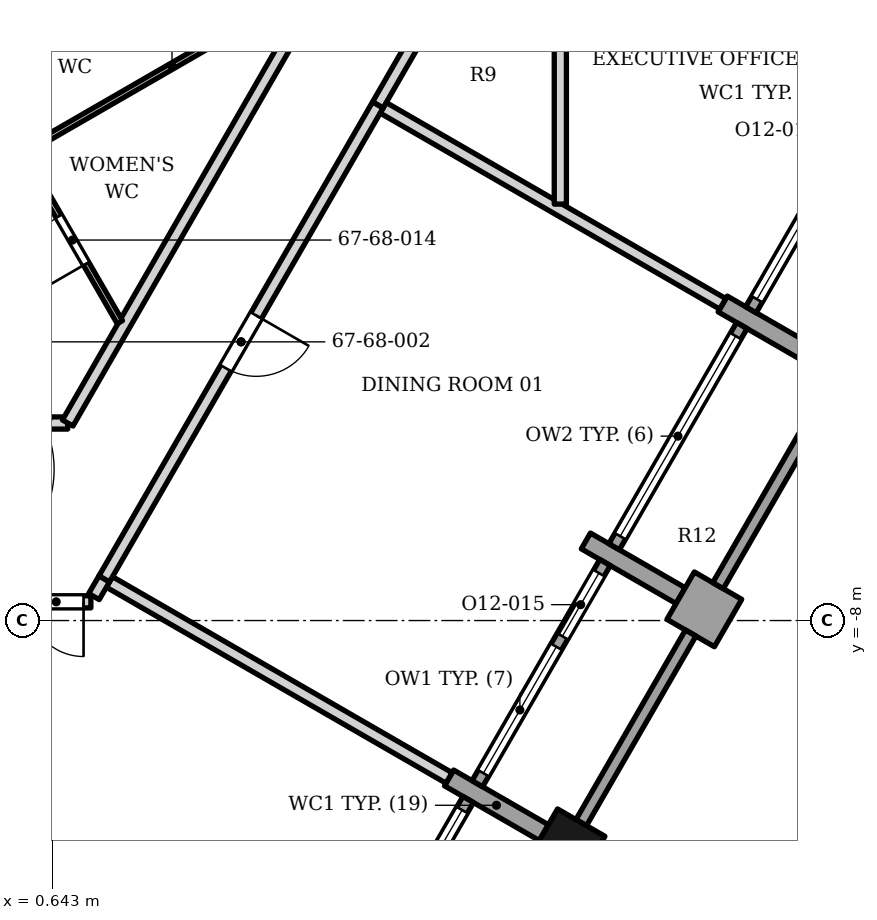
"""IFC4 building model, lengths in metres.
Left out: names, types, materials, properties, quantities, classifications, styles, units other than length and angle.
Written with IfcOpenShell. Run it as: python <this file> out.ifc"""

import sys

from ifc_helpers import new_model, si_unit, direction, frame, frame_2d, origin, origin_2d, place, context, subcontext, project, spatial, rectangle, extrude, element, fill, save


model = new_model("IFC4")
c1 = context("Model", 3, precision=1e-05, world=origin(), true_north=direction((0.0, 1.0)))
c2 = subcontext(c1, "Body", "Model", "MODEL_VIEW")
j1 = project(units=[si_unit("LENGTHUNIT", "METRE"), si_unit("PLANEANGLEUNIT", "RADIAN")], contexts=[c1])
p1 = place(None, origin())
s1 = spatial("IfcSite", under=j1, at=p1, CompositionType="ELEMENT")
p2 = place(p1, origin())
s2 = spatial("IfcBuilding", under=s1, at=p2, CompositionType="ELEMENT")
p3 = place(p2, frame((0.0, 0.0, 279.4)))
s3 = spatial("IfcBuildingStorey", under=s2, at=p3, CompositionType="ELEMENT", Elevation=279.4)
p4 = place(p3, frame((9.119, -11.713, 0.0), z_axis=(0.0, 0.0, 1.0), x_axis=(0.5, 0.866025403784, 0.0)))
e1 = element("IfcColumn", 1, at=p4, inside=s3, PredefinedType="COLUMN", context=c2, shape_type="SweptSolid", body=[
    extrude(rectangle(XDim=0.9, YDim=0.9, at=origin_2d()), origin(), (0.0, 0.0, 1.0), 3.9),
])
p5 = place(p3, frame((8.729, -11.488, 0.0), z_axis=(0.0, 0.0, 1.0), x_axis=(-0.866047807691, 0.499961193289, 0.0)))
e2 = element("IfcWall", 2, at=p5, inside=s3, PredefinedType="SOLIDWALL", context=c2, shape_type="SweptSolid", body=[
    extrude(rectangle(XDim=1.8, YDim=0.3, at=frame_2d((0.9, 0.0))), origin(), (0.0, 0.0, 1.0), 3.0),
])
p6 = place(p3, frame((11.759, -8.041, 0.0), z_axis=(0.0, 0.0, 1.0), x_axis=(-0.866013897511, 0.50001992892, 0.0)))
e3 = element("IfcWall", 3, at=p6, inside=s3, PredefinedType="SOLIDWALL", context=c2, shape_type="SweptSolid", body=[
    extrude(rectangle(XDim=0.9, YDim=0.9, at=frame_2d((0.45, 0.0))), origin(), (0.0, 0.0, 1.0), 3.0),
])
for number, where, z_axis, x_axis in (
    (4, (9.42, -6.691, 0.0), (0.0, 0.0, 1.0), (0.866, -0.5, 0.0)),
    (5, (13.229, -3.694, 0.0), (0.0, 0.0, 1.0), (-0.866, 0.5, 0.0)),
):
    element("IfcWall", number, at=place(p3, frame(where, z_axis=z_axis, x_axis=x_axis)), inside=s3, PredefinedType="SOLIDWALL", context=c2, shape_type="SweptSolid", body=[
        extrude(rectangle(XDim=1.8, YDim=0.3, at=frame_2d((0.9, 0.0))), origin(), (0.0, 0.0, 1.0), 3.0),
    ])
p7 = place(p3, frame((5.385, -14.58, 0.0), z_axis=(0.0, 0.0, 1.0), x_axis=(0.500002543286, 0.866023935413, 0.0)))
e6 = element("IfcWall", 6, at=p7, inside=s3, PredefinedType="ELEMENTEDWALL", context=c2, shape_type="SweptSolid", body=[
    extrude(rectangle(XDim=4.2, YDim=0.2, at=frame_2d((2.1, 0.0))), origin(), (0.0, 0.0, 1.0), 2.95),
])
p8 = place(p7, frame((0.2, 0.0, 0.45)))
e7 = element("IfcOpeningElement", 7, at=p8, cuts=e6, PredefinedType="OPENING", context=c2, shape_type="SweptSolid", body=[
    extrude(rectangle(XDim=3.8, YDim=2.25, at=frame_2d((1.9, 1.125))), frame((0.0, 0.11, 0.0), z_axis=(0.0, -1.0, 0.0), x_axis=(1.0, 0.0, 0.0)), (0.0, 0.0, 1.0), 0.22),
])
p9 = place(p3, frame((9.344, -11.323, 0.0), z_axis=(0.0, 0.0, 1.0), x_axis=(0.500012057535, 0.866018442252, 0.0)))
e8 = element("IfcWall", 8, at=p9, inside=s3, PredefinedType="SOLIDWALL", context=c2, shape_type="SweptSolid", body=[
    extrude(rectangle(XDim=3.6, YDim=0.2, at=frame_2d((1.8, 0.0))), origin(), (0.0, 0.0, 1.0), 3.0),
])
p10 = place(p3, frame((7.635, -10.683, 0.0), z_axis=(0.0, 0.0, 1.0), x_axis=(0.500027713859, 0.866009402589, 0.0)))
e9 = element("IfcWall", 9, at=p10, inside=s3, PredefinedType="ELEMENTEDWALL", context=c2, shape_type="SweptSolid", body=[
    extrude(rectangle(XDim=4.2, YDim=0.2, at=frame_2d((2.1, 0.0))), origin(), (0.0, 0.0, 1.0), 3.0),
])
p11 = place(p10, frame((0.2, 0.0, 0.45)))
e10 = element("IfcOpeningElement", 10, at=p11, cuts=e9, PredefinedType="OPENING", context=c2, shape_type="SweptSolid", body=[
    extrude(rectangle(XDim=2.4, YDim=2.25, at=frame_2d((1.2, 1.125))), frame((0.0, 0.11, 0.0), z_axis=(0.0, -1.0, 0.0), x_axis=(1.0, 0.0, 0.0)), (0.0, 0.0, 1.0), 0.22),
])
p12 = place(p10, frame((2.8, 0.0, 0.0)))
e11 = element("IfcOpeningElement", 11, at=p12, cuts=e9, PredefinedType="OPENING", context=c2, shape_type="SweptSolid", body=[
    extrude(rectangle(XDim=1.2, YDim=2.7, at=frame_2d((0.6, 1.35))), frame((0.0, 0.11, 0.0), z_axis=(0.0, -1.0, 0.0), x_axis=(1.0, 0.0, 0.0)), (0.0, 0.0, 1.0), 0.22),
])
p13 = place(p3, frame((11.594, -7.426, 0.0), z_axis=(0.0, 0.0, 1.0), x_axis=(0.500012057535, 0.866018442252, 0.0)))
e12 = element("IfcWall", 12, at=p13, inside=s3, PredefinedType="SOLIDWALL", context=c2, shape_type="SweptSolid", body=[
    extrude(rectangle(XDim=3.6, YDim=0.2, at=frame_2d((1.8, 0.0))), origin(), (0.0, 0.0, 1.0), 3.0),
])
p14 = place(p3, frame((9.885, -6.786, 0.0), z_axis=(0.0, 0.0, 1.0), x_axis=(0.500002543286, 0.866023935413, 0.0)))
e13 = element("IfcWall", 13, at=p14, inside=s3, PredefinedType="ELEMENTEDWALL", context=c2, shape_type="SweptSolid", body=[
    extrude(rectangle(XDim=4.2, YDim=0.2, at=frame_2d((2.1, 0.0))), origin(), (0.0, 0.0, 1.0), 3.0),
])
p15 = place(p14, frame((0.2, 0.0, 0.45)))
e14 = element("IfcOpeningElement", 14, at=p15, cuts=e13, PredefinedType="OPENING", context=c2, shape_type="SweptSolid", body=[
    extrude(rectangle(XDim=3.8, YDim=2.25, at=frame_2d((1.9, 1.125))), frame((0.0, 0.11, 0.0), z_axis=(0.0, -1.0, 0.0), x_axis=(1.0, 0.0, 0.0)), (0.0, 0.0, 1.0), 0.22),
])
p16 = place(p3, frame((12.135, -2.889, 0.0), z_axis=(0.0, 0.0, 1.0), x_axis=(0.500027713859, 0.866009402589, 0.0)))
e15 = element("IfcWall", 15, at=p16, inside=s3, PredefinedType="ELEMENTEDWALL", context=c2, shape_type="SweptSolid", body=[
    extrude(rectangle(XDim=4.2, YDim=0.2, at=frame_2d((2.1, 0.0))), origin(), (0.0, 0.0, 1.0), 3.0),
])
p17 = place(p16, frame((0.2, 0.0, 0.45)))
e16 = element("IfcOpeningElement", 16, at=p17, cuts=e15, PredefinedType="OPENING", context=c2, shape_type="SweptSolid", body=[
    extrude(rectangle(XDim=2.4, YDim=2.25, at=frame_2d((1.2, 1.125))), frame((0.0, 0.11, 0.0), z_axis=(0.0, -1.0, 0.0), x_axis=(1.0, 0.0, 0.0)), (0.0, 0.0, 1.0), 0.22),
])
p18 = place(p16, frame((2.8, 0.0, 0.0)))
e17 = element("IfcOpeningElement", 17, at=p18, cuts=e15, PredefinedType="OPENING", context=c2, shape_type="SweptSolid", body=[
    extrude(rectangle(XDim=1.2, YDim=2.7, at=frame_2d((0.6, 1.35))), frame((0.0, 0.11, 0.0), z_axis=(0.0, -1.0, 0.0), x_axis=(1.0, 0.0, 0.0)), (0.0, 0.0, 1.0), 0.22),
])
p19 = place(p3, frame((1.584, -7.365, 0.0), z_axis=(0.0, 0.0, 1.0), x_axis=(0.866145880339, -0.499791270404, 0.0)))
e18 = element("IfcWall", 18, at=p19, inside=s3, PredefinedType="PARTITIONING", context=c2, shape_type="SweptSolid", body=[
    extrude(rectangle(XDim=6.449, YDim=0.2, at=frame_2d((3.225, 0.0))), origin(), (0.0, 0.0, 1.0), 2.884),
])
p20 = place(p3, frame((0.236, -7.692, 0.0), z_axis=(0.0, 0.0, 1.0), x_axis=(1.0, 0.0, 0.0)))
e19 = element("IfcWall", 19, at=p20, inside=s3, PredefinedType="PARTITIONING", context=c2, shape_type="SweptSolid", body=[
    extrude(rectangle(XDim=1.043, YDim=0.2, at=frame_2d((0.522, 0.0))), origin(), (0.0, 0.0, 1.0), 3.73),
])
p21 = place(p20, frame((0.023, 0.0, 0.0)))
e20 = element("IfcOpeningElement", 20, at=p21, cuts=e19, PredefinedType="OPENING", context=c2, shape_type="SweptSolid", body=[
    extrude(rectangle(XDim=0.9, YDim=2.1, at=frame_2d((0.45, 1.05))), frame((0.0, 0.11, 0.0), z_axis=(0.0, -1.0, 0.0), x_axis=(1.0, 0.0, 0.0)), (0.0, 0.0, 1.0), 0.22),
])
p22 = place(p3, frame((1.33, -7.606, 0.0), z_axis=(0.0, 0.0, 1.0), x_axis=(0.503375579216, 0.86406772087, 0.0)))
e21 = element("IfcWall", 21, at=p22, inside=s3, PredefinedType="PARTITIONING", context=c2, shape_type="SweptSolid", body=[
    extrude(rectangle(XDim=0.337, YDim=0.2, at=frame_2d((0.168, 0.0))), origin(), (0.0, 0.0, 1.0), 3.73),
])
p23 = place(p3, frame((0.517, -4.751, 0.0), z_axis=(0.0, 0.0, 1.0), x_axis=(1.0, 0.0, 0.0)))
e22 = element("IfcWall", 22, at=p23, inside=s3, PredefinedType="PARTITIONING", context=c2, shape_type="SweptSolid", body=[
    extrude(rectangle(XDim=0.381, YDim=0.2, at=frame_2d((0.19, 0.0))), origin(), (0.0, 0.0, 1.0), 3.73),
])
p24 = place(p3, frame((0.898, -4.751, 0.0), z_axis=(0.0, 0.0, 1.0), x_axis=(0.499141293918, 0.866520610664, 0.0)))
e23 = element("IfcWall", 23, at=p24, inside=s3, PredefinedType="PARTITIONING", context=c2, shape_type="SweptSolid", body=[
    extrude(rectangle(XDim=8.451, YDim=0.2, at=frame_2d((4.226, 0.0))), origin(), (0.0, 0.0, 1.0), 2.884),
])
p25 = place(p3, frame((6.086, 0.433, 0.0), z_axis=(0.0, 0.0, 1.0), x_axis=(0.866035557451, -0.499982412921, 0.0)))
e24 = element("IfcWall", 24, at=p25, inside=s3, PredefinedType="PARTITIONING", context=c2, shape_type="SweptSolid", body=[
    extrude(rectangle(XDim=6.449, YDim=0.2, at=frame_2d((3.225, 0.0))), origin(), (0.0, 0.0, 1.0), 3.052),
])
p26 = place(p3, frame((1.5, -7.314, 0.0), z_axis=(0.0, 0.0, 1.0), x_axis=(0.499990139034, 0.866031096941, 0.0)))
e25 = element("IfcWall", 25, at=p26, inside=s3, PredefinedType="PARTITIONING", context=c2, shape_type="SweptSolid", body=[
    extrude(rectangle(XDim=9.0, YDim=0.2, at=frame_2d((4.5, 0.0))), origin(), (0.0, 0.0, 1.0), 2.884),
])
p27 = place(p26, frame((4.0, 0.0, 0.0)))
e26 = element("IfcOpeningElement", 26, at=p27, cuts=e25, PredefinedType="OPENING", context=c2, shape_type="SweptSolid", body=[
    extrude(rectangle(XDim=1.0, YDim=2.1, at=frame_2d((0.5, 1.05))), frame((0.0, 0.11, 0.0), z_axis=(0.0, -1.0, 0.0), x_axis=(1.0, 0.0, 0.0)), (0.0, 0.0, 1.0), 0.22),
])
p28 = place(p3, frame((9.0, -1.152, 0.0), z_axis=(0.0, 0.0, 1.0), x_axis=(0.0, 1.0, 0.0)))
e27 = element("IfcWall", 27, at=p28, inside=s3, PredefinedType="PARTITIONING", context=c2, shape_type="SweptSolid", body=[
    extrude(rectangle(XDim=3.152, YDim=0.2, at=frame_2d((1.576, 0.0))), origin(), (0.0, 0.0, 1.0), 3.052),
])
p29 = place(p3, frame((-1.33, 2.252, 0.0), z_axis=(0.0, 0.0, 1.0), x_axis=(0.499984964964, -0.866034084092, 0.0)))
e28 = element("IfcWall", 28, at=p29, inside=s3, PredefinedType="PARTITIONING", context=c2, shape_type="SweptSolid", body=[
    extrude(rectangle(XDim=6.172, YDim=0.1, at=frame_2d((3.086, 0.0))), origin(), (0.0, 0.0, 1.0), 2.884),
])
p30 = place(p29, frame((1.026, 0.0, 0.0)))
e29 = element("IfcOpeningElement", 29, at=p30, cuts=e28, PredefinedType="OPENING", context=c2, shape_type="SweptSolid", body=[
    extrude(rectangle(XDim=0.9, YDim=2.1, at=frame_2d((0.45, 1.05))), frame((0.0, 0.06, 0.0), z_axis=(0.0, -1.0, 0.0), x_axis=(1.0, 0.0, 0.0)), (0.0, 0.0, 1.0), 0.12),
])
p31 = place(p29, frame((4.163, 0.0, 0.0)))
e30 = element("IfcOpeningElement", 30, at=p31, cuts=e28, PredefinedType="OPENING", context=c2, shape_type="SweptSolid", body=[
    extrude(rectangle(XDim=0.9, YDim=2.1, at=frame_2d((0.45, 1.05))), frame((0.0, 0.06, 0.0), z_axis=(0.0, -1.0, 0.0), x_axis=(1.0, 0.0, 0.0)), (0.0, 0.0, 1.0), 0.12),
])
p32 = place(p3, frame((0.19, -0.281, 0.0), z_axis=(0.0, 0.0, 1.0), x_axis=(0.866035935605, 0.499981757907, 0.0)))
e31 = element("IfcWall", 31, at=p32, inside=s3, PredefinedType="PARTITIONING", context=c2, shape_type="SweptSolid", body=[
    extrude(rectangle(XDim=5.596, YDim=0.1, at=frame_2d((2.798, 0.0))), origin(), (0.0, 0.0, 1.0), 2.884),
])
p33 = place(p3, frame((6.0, 0.481, 0.0), z_axis=(0.0, 0.0, 1.0), x_axis=(0.499648797631, 0.866228075639, 0.0)))
e32 = element("IfcWall", 32, at=p33, inside=s3, PredefinedType="PARTITIONING", context=c2, shape_type="SweptSolid", body=[
    extrude(rectangle(XDim=3.539, YDim=0.2, at=frame_2d((1.77, 0.0))), origin(), (0.0, 0.0, 1.0), 3.73),
])
p34 = place(p33, frame((1.27, 0.0, 0.0)))
e33 = element("IfcOpeningElement", 33, at=p34, cuts=e32, PredefinedType="OPENING", context=c2, shape_type="SweptSolid", body=[
    extrude(rectangle(XDim=1.0, YDim=2.4, at=frame_2d((0.5, 1.2))), frame((0.0, 0.11, 0.0), z_axis=(0.0, -1.0, 0.0), x_axis=(1.0, 0.0, 0.0)), (0.0, 0.0, 1.0), 0.22),
])
p35 = place(p8, origin())
e34 = element("IfcWindow", 34, at=p35, inside=s3, PartitioningType="SINGLE_PANEL", PredefinedType="WINDOW", context=c2, shape_type="SweptSolid", body=[
    extrude(rectangle(XDim=3.8, YDim=2.25, at=frame_2d((1.9, 1.125))), frame((0.0, 0.03, 0.0), z_axis=(0.0, -1.0, 0.0), x_axis=(1.0, 0.0, 0.0)), (0.0, 0.0, 1.0), 0.06),
])
fill(e7, e34)
p36 = place(p11, origin())
e35 = element("IfcWindow", 35, at=p36, inside=s3, PartitioningType="SINGLE_PANEL", PredefinedType="WINDOW", context=c2, shape_type="SweptSolid", body=[
    extrude(rectangle(XDim=2.4, YDim=2.25, at=frame_2d((1.2, 1.125))), frame((0.0, 0.03, 0.0), z_axis=(0.0, -1.0, 0.0), x_axis=(1.0, 0.0, 0.0)), (0.0, 0.0, 1.0), 0.06),
])
fill(e10, e35)
p37 = place(p12, origin())
e36 = element("IfcDoor", 36, at=p37, inside=s3, OperationType="SINGLE_SWING_LEFT", PredefinedType="DOOR", context=c2, shape_type="SweptSolid", body=[
    extrude(rectangle(XDim=1.2, YDim=2.7, at=frame_2d((0.6, 1.35))), frame((0.0, 0.025, 0.0), z_axis=(0.0, -1.0, 0.0), x_axis=(1.0, 0.0, 0.0)), (0.0, 0.0, 1.0), 0.05),
])
fill(e11, e36)
p38 = place(p15, origin())
e37 = element("IfcWindow", 37, at=p38, inside=s3, PartitioningType="SINGLE_PANEL", PredefinedType="WINDOW", context=c2, shape_type="SweptSolid", body=[
    extrude(rectangle(XDim=3.8, YDim=2.25, at=frame_2d((1.9, 1.125))), frame((0.0, 0.03, 0.0), z_axis=(0.0, -1.0, 0.0), x_axis=(1.0, 0.0, 0.0)), (0.0, 0.0, 1.0), 0.06),
])
fill(e14, e37)
p39 = place(p17, origin())
e38 = element("IfcWindow", 38, at=p39, inside=s3, PartitioningType="SINGLE_PANEL", PredefinedType="WINDOW", context=c2, shape_type="SweptSolid", body=[
    extrude(rectangle(XDim=2.4, YDim=2.25, at=frame_2d((1.2, 1.125))), frame((0.0, 0.03, 0.0), z_axis=(0.0, -1.0, 0.0), x_axis=(1.0, 0.0, 0.0)), (0.0, 0.0, 1.0), 0.06),
])
fill(e16, e38)
p40 = place(p27, origin())
e39 = element("IfcDoor", 39, at=p40, inside=s3, OperationType="SINGLE_SWING_RIGHT", PredefinedType="DOOR", context=c2, shape_type="SweptSolid", body=[
    extrude(rectangle(XDim=1.0, YDim=2.1, at=frame_2d((0.5, 1.05))), frame((0.0, 0.025, 0.0), z_axis=(0.0, -1.0, 0.0), x_axis=(1.0, 0.0, 0.0)), (0.0, 0.0, 1.0), 0.05),
])
fill(e26, e39)
p41 = place(p21, origin())
e40 = element("IfcDoor", 40, at=p41, inside=s3, OperationType="SINGLE_SWING_RIGHT", PredefinedType="DOOR", context=c2, shape_type="SweptSolid", body=[
    extrude(rectangle(XDim=0.9, YDim=2.1, at=frame_2d((0.45, 1.05))), frame((0.0, 0.025, 0.0), z_axis=(0.0, -1.0, 0.0), x_axis=(1.0, 0.0, 0.0)), (0.0, 0.0, 1.0), 0.05),
])
fill(e20, e40)
p42 = place(p31, origin())
e41 = element("IfcDoor", 41, at=p42, inside=s3, OperationType="SINGLE_SWING_RIGHT", PredefinedType="DOOR", context=c2, shape_type="SweptSolid", body=[
    extrude(rectangle(XDim=0.9, YDim=2.1, at=frame_2d((0.45, 1.05))), frame((0.0, 0.025, 0.0), z_axis=(0.0, -1.0, 0.0), x_axis=(1.0, 0.0, 0.0)), (0.0, 0.0, 1.0), 0.05),
])
fill(e30, e41)
save(model, sys.argv[1])
